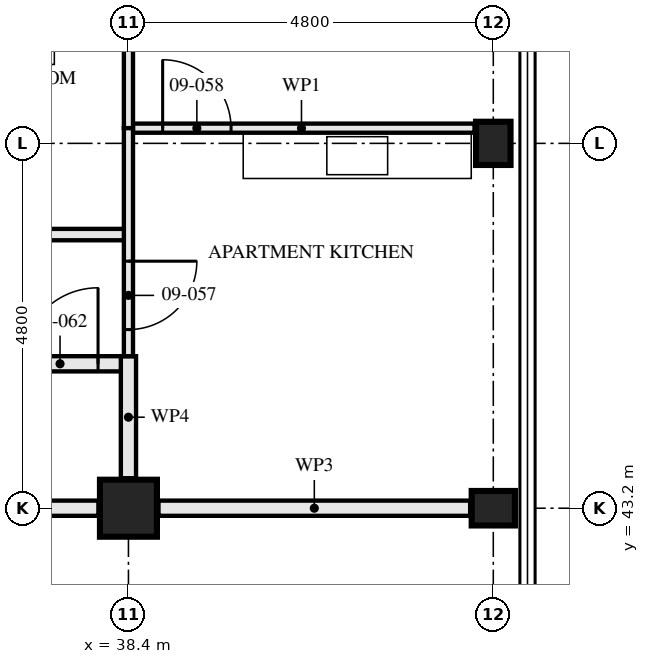
"""IFC4 building model, lengths in metres.
Left out: names, types, materials, properties, quantities, classifications, styles, units other than length and angle.
Written with IfcOpenShell. Run it as: python <this file> out.ifc"""

import sys

from ifc_helpers import new_model, si_unit, direction, frame, frame_2d, origin, origin_2d, place, context, subcontext, project, spatial, rectangle, hollow_rectangle, i_section, extrude, element, fill, save


model = new_model("IFC4")
c1 = context("Model", 3, precision=1e-05, world=origin(), true_north=direction((0.0, 1.0)))
c2 = subcontext(c1, "Body", "Model", "MODEL_VIEW")
j1 = project(units=[si_unit("LENGTHUNIT", "METRE"), si_unit("PLANEANGLEUNIT", "RADIAN")], contexts=[c1])
p1 = place(None, origin())
s1 = spatial("IfcSite", under=j1, at=p1, CompositionType="ELEMENT")
p2 = place(p1, origin())
s2 = spatial("IfcBuilding", under=s1, at=p2, CompositionType="ELEMENT")
p3 = place(p2, frame((0.0, 0.0, 37.5)))
s3 = spatial("IfcBuildingStorey", under=s2, at=p3, CompositionType="ELEMENT", Elevation=37.5)
p4 = place(p3, frame((38.4, 43.2, 0.0), z_axis=(0.0, 0.0, 1.0), x_axis=(0.0, 1.0, 0.0)))
e1 = element("IfcColumn", 1, at=p4, inside=s3, PredefinedType="COLUMN", context=c2, shape_type="SweptSolid", body=[
    extrude(hollow_rectangle(XDim=0.75, YDim=0.75, WallThickness=0.08, at=origin_2d()), origin(), (0.0, 0.0, 1.0), 3.5),
])
for number, where, z_axis, x_axis in (
    (2, (43.2, 43.2, 0.0), (0.0, 0.0, 1.0), (0.0, 1.0, 0.0)),
    (3, (43.2, 48.0, 0.0), (0.0, 0.0, 1.0), (1.0, 0.0, 0.0)),
):
    element("IfcColumn", number, at=place(p3, frame(where, z_axis=z_axis, x_axis=x_axis)), inside=s3, PredefinedType="COLUMN", context=c2, shape_type="SweptSolid", body=[
        extrude(i_section(OverallWidth=0.454, OverallDepth=0.569, WebThickness=0.078, FlangeThickness=0.125, FilletRadius=0.015, at=origin_2d()), origin(), (0.0, 0.0, 1.0), 3.5),
    ])
p5 = place(p3, frame((38.4, 46.8, 0.0), z_axis=(0.0, 0.0, 1.0), x_axis=(-1.0, 0.0, 0.0)))
e4 = element("IfcWall", 4, at=p5, inside=s3, PredefinedType="PARTITIONING", context=c2, shape_type="SweptSolid", body=[
    extrude(rectangle(XDim=2.8, YDim=0.15, at=frame_2d((1.4, 0.0))), origin(), (0.0, 0.0, 1.0), 3.33),
])
p6 = place(p3, frame((38.4, 48.2, 0.0), z_axis=(0.0, 0.0, 1.0), x_axis=(0.0, -1.0, 0.0)))
e5 = element("IfcWall", 5, at=p6, inside=s3, PredefinedType="PARTITIONING", context=c2, shape_type="SweptSolid", body=[
    extrude(rectangle(XDim=3.0, YDim=0.12, at=frame_2d((1.5, 0.0))), origin(), (0.0, 0.0, 1.0), 2.55),
])
p7 = place(p6, frame((1.75, 0.0, 0.0)))
e6 = element("IfcOpeningElement", 6, at=p7, cuts=e5, PredefinedType="OPENING", context=c2, shape_type="SweptSolid", body=[
    extrude(rectangle(XDim=0.9, YDim=2.1, at=frame_2d((0.45, 1.05))), frame((0.0, 0.071, 0.0), z_axis=(0.0, -1.0, 0.0), x_axis=(1.0, 0.0, 0.0)), (0.0, 0.0, 1.0), 0.141),
])
p8 = place(p3, frame((42.953, 48.2, 0.0), z_axis=(0.0, 0.0, 1.0), x_axis=(-1.0, 0.0, 0.0)))
e7 = element("IfcWall", 7, at=p8, inside=s3, PredefinedType="PARTITIONING", context=c2, shape_type="SweptSolid", body=[
    extrude(rectangle(XDim=4.553, YDim=0.12, at=frame_2d((2.276, 0.0))), origin(), (0.0, 0.0, 1.0), 3.33),
])
p9 = place(p8, frame((3.203, 0.0, 0.0)))
e8 = element("IfcOpeningElement", 8, at=p9, cuts=e7, PredefinedType="OPENING", context=c2, shape_type="SweptSolid", body=[
    extrude(rectangle(XDim=0.9, YDim=2.1, at=frame_2d((0.45, 1.05))), frame((0.0, 0.071, 0.0), z_axis=(0.0, -1.0, 0.0), x_axis=(1.0, 0.0, 0.0)), (0.0, 0.0, 1.0), 0.141),
])
p10 = place(p3, frame((38.4, 52.48, 0.0), z_axis=(0.0, 0.0, 1.0), x_axis=(0.0, -1.0, 0.0)))
e9 = element("IfcWall", 9, at=p10, inside=s3, PredefinedType="PARTITIONING", context=c2, shape_type="SweptSolid", body=[
    extrude(rectangle(XDim=4.28, YDim=0.12, at=frame_2d((2.14, 0.0))), origin(), (0.0, 0.0, 1.0), 3.33),
])
p11 = place(p3, frame((38.4, 45.1, 0.0), z_axis=(0.0, 0.0, 1.0), x_axis=(-1.0, 0.0, 0.0)))
e10 = element("IfcWall", 10, at=p11, inside=s3, PredefinedType="PARTITIONING", context=c2, shape_type="SweptSolid", body=[
    extrude(rectangle(XDim=9.6, YDim=0.2, at=frame_2d((4.8, 0.0))), origin(), (0.0, 0.0, 1.0), 3.33),
])
p12 = place(p11, frame((0.4, 0.0, 0.0)))
e11 = element("IfcOpeningElement", 11, at=p12, cuts=e10, PredefinedType="OPENING", context=c2, shape_type="SweptSolid", body=[
    extrude(rectangle(XDim=1.0, YDim=2.1, at=frame_2d((0.5, 1.05))), frame((0.0, 0.111, 0.0), z_axis=(0.0, -1.0, 0.0), x_axis=(1.0, 0.0, 0.0)), (0.0, 0.0, 1.0), 0.221),
])
p13 = place(p11, frame((5.2, 0.0, 0.0)))
e12 = element("IfcOpeningElement", 12, at=p13, cuts=e10, PredefinedType="OPENING", context=c2, shape_type="SweptSolid", body=[
    extrude(rectangle(XDim=1.0, YDim=2.1, at=frame_2d((0.5, 1.05))), frame((0.0, 0.111, 0.0), z_axis=(0.0, -1.0, 0.0), x_axis=(1.0, 0.0, 0.0)), (0.0, 0.0, 1.0), 0.221),
])
p14 = place(p3, frame((38.4, 45.2, 0.0), z_axis=(0.0, 0.0, 1.0), x_axis=(0.0, -1.0, 0.0)))
e13 = element("IfcWall", 13, at=p14, inside=s3, PredefinedType="PARTITIONING", context=c2, shape_type="SweptSolid", body=[
    extrude(rectangle(XDim=1.605, YDim=0.2, at=frame_2d((0.802, 0.0))), origin(), (0.0, 0.0, 1.0), 3.33),
])
p15 = place(p3, frame((42.896, 43.2, 0.0), z_axis=(0.0, 0.0, 1.0), x_axis=(-1.0, 0.0, 0.0)))
e14 = element("IfcWall", 14, at=p15, inside=s3, PredefinedType="PARTITIONING", context=c2, shape_type="SweptSolid", body=[
    extrude(rectangle(XDim=4.101, YDim=0.2, at=frame_2d((2.05, 0.0))), origin(), (0.0, 0.0, 1.0), 2.32),
])
p16 = place(p3, frame((38.005, 43.2, 0.0), z_axis=(0.0, 0.0, 1.0), x_axis=(-1.0, 0.0, 0.0)))
e15 = element("IfcWall", 15, at=p16, inside=s3, PredefinedType="PARTITIONING", context=c2, shape_type="SweptSolid", body=[
    extrude(rectangle(XDim=4.01, YDim=0.2, at=frame_2d((2.005, 0.0))), origin(), (0.0, 0.0, 1.0), 2.32),
])
p17 = place(p7, origin())
e16 = element("IfcDoor", 16, at=p17, inside=s3, OperationType="SINGLE_SWING_RIGHT", PredefinedType="DOOR", context=c2, shape_type="SweptSolid", body=[
    extrude(rectangle(XDim=0.9, YDim=2.1, at=frame_2d((0.45, 1.05))), frame((0.0, 0.022, 0.0), z_axis=(0.0, -1.0, 0.0), x_axis=(1.0, 0.0, 0.0)), (0.0, 0.0, 1.0), 0.044),
])
fill(e6, e16)
p18 = place(p9, frame((0.9, 0.0, 0.0), z_axis=(0.0, 0.0, 1.0), x_axis=(-1.0, 0.0, 0.0)))
e17 = element("IfcDoor", 17, at=p18, inside=s3, OperationType="SINGLE_SWING_RIGHT", PredefinedType="DOOR", context=c2, shape_type="SweptSolid", body=[
    extrude(rectangle(XDim=0.9, YDim=2.1, at=frame_2d((0.45, 1.05))), frame((0.0, 0.022, 0.0), z_axis=(0.0, -1.0, 0.0), x_axis=(1.0, 0.0, 0.0)), (0.0, 0.0, 1.0), 0.044),
])
fill(e8, e17)
p19 = place(p12, frame((1.0, 0.0, 0.0), z_axis=(0.0, 0.0, 1.0), x_axis=(-1.0, 0.0, 0.0)))
e18 = element("IfcDoor", 18, at=p19, inside=s3, OperationType="SINGLE_SWING_LEFT", PredefinedType="DOOR", context=c2, shape_type="SweptSolid", body=[
    extrude(rectangle(XDim=1.0, YDim=2.1, at=frame_2d((0.5, 1.05))), frame((0.0, 0.027, 0.0), z_axis=(0.0, -1.0, 0.0), x_axis=(1.0, 0.0, 0.0)), (0.0, 0.0, 1.0), 0.054),
])
fill(e11, e18)
save(model, sys.argv[1])
